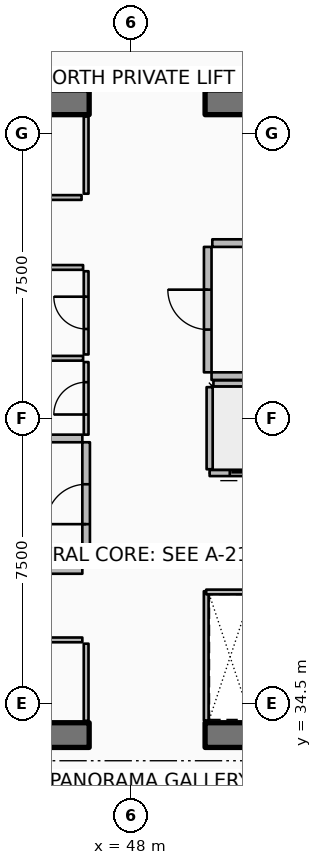
"""IFC4 building model, lengths in metres.
Left out: names, types, materials, properties, quantities, classifications, styles, units other than length and angle.
Written with IfcOpenShell. Run it as: python <this file> out.ifc"""

import sys

from ifc_helpers import new_model, si_unit, direction, frame, frame_2d, origin, place, context, subcontext, project, spatial, rectangle, extrude, element, fill, save


model = new_model("IFC4")
c1 = context("Model", 3, precision=1e-05, world=origin(), true_north=direction((0.0, 1.0)))
c2 = subcontext(c1, "Body", "Model", "MODEL_VIEW")
j1 = project(units=[si_unit("LENGTHUNIT", "METRE"), si_unit("PLANEANGLEUNIT", "RADIAN")], contexts=[c1])
p1 = place(None, origin())
s1 = spatial("IfcSite", under=j1, at=p1, CompositionType="ELEMENT")
p2 = place(p1, origin())
s2 = spatial("IfcBuilding", under=s1, at=p2, CompositionType="ELEMENT")
p3 = place(p2, frame((0.0, 0.0, 240.55)))
s3 = spatial("IfcBuildingStorey", under=s2, at=p3, CompositionType="ELEMENT", Elevation=240.55)
for number, where, z_axis, x_axis in (
    (1, (37.15, 33.675, 0.0), (0.0, 0.0, 1.0), (1.0, 0.0, 0.0)),
    (2, (49.95, 33.675, 0.0), (0.0, 0.0, 1.0), (1.0, 0.0, 0.0)),
    (3, (37.15, 50.325, 0.0), (0.0, 0.0, 1.0), (1.0, 0.0, 0.0)),
    (4, (49.95, 50.325, 0.0), (0.0, 0.0, 1.0), (1.0, 0.0, 0.0)),
):
    element("IfcWall", number, at=place(p3, frame(where, z_axis=z_axis, x_axis=x_axis)), inside=s3, PredefinedType="SHEAR", context=c2, shape_type="SweptSolid", body=[
        extrude(rectangle(XDim=9.75, YDim=0.65, at=frame_2d((4.875, 0.0))), origin(), (0.0, 0.0, 1.0), 3.85),
    ])
p4 = place(p3, frame((52.23, 40.57, 0.0), z_axis=(0.0, 0.0, 1.0), x_axis=(-1.0, 0.0, 0.0)))
e5 = element("IfcWall", 5, at=p4, inside=s3, PredefinedType="PARTITIONING", context=c2, shape_type="SweptSolid", body=[
    extrude(rectangle(XDim=2.16, YDim=0.16, at=frame_2d((1.08, 0.0))), origin(), (0.0, 0.0, 1.0), 3.59),
])
p5 = place(p4, frame((0.53, 0.0, 0.0)))
e6 = element("IfcOpeningElement", 6, at=p5, cuts=e5, PredefinedType="OPENING", context=c2, shape_type="SweptSolid", body=[
    extrude(rectangle(XDim=1.1, YDim=2.1, at=frame_2d((0.55, 1.05))), frame((0.0, 0.09, 0.0), z_axis=(0.0, -1.0, 0.0), x_axis=(1.0, 0.0, 0.0)), (0.0, 0.0, 1.0), 0.18),
])
p6 = place(p3, frame((50.07, 40.67, 0.0), z_axis=(0.0, 0.0, 1.0), x_axis=(0.0, 1.0, 0.0)))
e7 = element("IfcWall", 7, at=p6, inside=s3, PredefinedType="PARTITIONING", context=c2, shape_type="SweptSolid", body=[
    extrude(rectangle(XDim=2.16, YDim=0.16, at=frame_2d((1.08, 0.0))), origin(), (0.0, 0.0, 1.0), 3.59),
])
p7 = place(p3, frame((50.17, 42.93, 0.0), z_axis=(0.0, 0.0, 1.0), x_axis=(1.0, 0.0, 0.0)))
e8 = element("IfcWall", 8, at=p7, inside=s3, PredefinedType="PARTITIONING", context=c2, shape_type="SweptSolid", body=[
    extrude(rectangle(XDim=1.96, YDim=0.16, at=frame_2d((0.98, 0.0))), origin(), (0.0, 0.0, 1.0), 3.59),
])
p8 = place(p3, frame((46.82, 34.05, 0.0), z_axis=(0.0, 0.0, 1.0), x_axis=(0.0, 1.0, 0.0)))
e9 = element("IfcWall", 9, at=p8, inside=s3, PredefinedType="PARTITIONING", context=c2, shape_type="SweptSolid", body=[
    extrude(rectangle(XDim=2.03, YDim=0.125, at=frame_2d((1.015, 0.0))), origin(), (0.0, 0.0, 1.0), 3.03),
])
p9 = place(p3, frame((37.92, 36.18, 0.0), z_axis=(0.0, 0.0, 1.0), x_axis=(1.0, 0.0, 0.0)))
e10 = element("IfcWall", 10, at=p9, inside=s3, PredefinedType="PARTITIONING", context=c2, shape_type="SweptSolid", body=[
    extrude(rectangle(XDim=8.8, YDim=0.125, at=frame_2d((4.4, 0.0))), origin(), (0.0, 0.0, 1.0), 3.03),
])
p10 = place(p9, frame((3.975, 0.0, 0.0)))
e11 = element("IfcOpeningElement", 11, at=p10, cuts=e10, PredefinedType="OPENING", context=c2, shape_type="SweptSolid", body=[
    extrude(rectangle(XDim=0.85, YDim=2.06, at=frame_2d((0.425, 1.03))), frame((0.0, 0.073, 0.0), z_axis=(0.0, -1.0, 0.0), x_axis=(1.0, 0.0, 0.0)), (0.0, 0.0, 1.0), 0.145),
])
p11 = place(p3, frame((46.82, 47.92, 0.0), z_axis=(0.0, 0.0, 1.0), x_axis=(0.0, 1.0, 0.0)))
e12 = element("IfcWall", 12, at=p11, inside=s3, PredefinedType="PARTITIONING", context=c2, shape_type="SweptSolid", body=[
    extrude(rectangle(XDim=2.03, YDim=0.125, at=frame_2d((1.015, 0.0))), origin(), (0.0, 0.0, 1.0), 3.03),
])
p12 = place(p3, frame((42.2, 47.82, 0.0), z_axis=(0.0, 0.0, 1.0), x_axis=(1.0, 0.0, 0.0)))
e13 = element("IfcWall", 13, at=p12, inside=s3, PredefinedType="PARTITIONING", context=c2, shape_type="SweptSolid", body=[
    extrude(rectangle(XDim=4.5, YDim=0.125, at=frame_2d((2.25, 0.0))), origin(), (0.0, 0.0, 1.0), 3.03),
])
p13 = place(p12, frame((1.825, 0.0, 0.0)))
e14 = element("IfcOpeningElement", 14, at=p13, cuts=e13, PredefinedType="OPENING", context=c2, shape_type="SweptSolid", body=[
    extrude(rectangle(XDim=0.85, YDim=2.06, at=frame_2d((0.425, 1.03))), frame((0.0, 0.073, 0.0), z_axis=(0.0, -1.0, 0.0), x_axis=(1.0, 0.0, 0.0)), (0.0, 0.0, 1.0), 0.145),
])
p14 = place(p3, frame((41.35, 38.02, 0.0), z_axis=(0.0, 0.0, 1.0), x_axis=(1.0, 0.0, 0.0)))
e15 = element("IfcWall", 15, at=p14, inside=s3, PredefinedType="PARTITIONING", context=c2, shape_type="SweptSolid", body=[
    extrude(rectangle(XDim=5.37, YDim=0.2, at=frame_2d((2.685, 0.0))), origin(), (0.0, 0.0, 1.0), 3.59),
])
p15 = place(p3, frame((43.92, 41.48, 0.0), z_axis=(0.0, 0.0, 1.0), x_axis=(1.0, 0.0, 0.0)))
e16 = element("IfcWall", 16, at=p15, inside=s3, PredefinedType="PARTITIONING", context=c2, shape_type="SweptSolid", body=[
    extrude(rectangle(XDim=2.8, YDim=0.2, at=frame_2d((1.4, 0.0))), origin(), (0.0, 0.0, 1.0), 3.59),
])
p16 = place(p3, frame((46.82, 38.12, 0.0), z_axis=(0.0, 0.0, 1.0), x_axis=(0.0, 1.0, 0.0)))
e17 = element("IfcWall", 17, at=p16, inside=s3, PredefinedType="PARTITIONING", context=c2, shape_type="SweptSolid", body=[
    extrude(rectangle(XDim=3.26, YDim=0.2, at=frame_2d((1.63, 0.0))), origin(), (0.0, 0.0, 1.0), 3.59),
])
p17 = place(p16, frame((1.105, 0.0, 0.0)))
e18 = element("IfcOpeningElement", 18, at=p17, cuts=e17, PredefinedType="OPENING", context=c2, shape_type="SweptSolid", body=[
    extrude(rectangle(XDim=1.05, YDim=2.1, at=frame_2d((0.525, 1.05))), frame((0.0, 0.11, 0.0), z_axis=(0.0, -1.0, 0.0), x_axis=(1.0, 0.0, 0.0)), (0.0, 0.0, 1.0), 0.22),
])
p18 = place(p3, frame((50.12, 43.12, 0.0), z_axis=(0.0, 0.0, 1.0), x_axis=(1.0, 0.0, 0.0)))
e19 = element("IfcWall", 19, at=p18, inside=s3, PredefinedType="PARTITIONING", context=c2, shape_type="SweptSolid", body=[
    extrude(rectangle(XDim=8.88, YDim=0.2, at=frame_2d((4.44, 0.0))), origin(), (0.0, 0.0, 1.0), 3.59),
])
p19 = place(p3, frame((50.14, 46.62, 0.0), z_axis=(0.0, 0.0, 1.0), x_axis=(1.0, 0.0, 0.0)))
e20 = element("IfcWall", 20, at=p19, inside=s3, PredefinedType="PARTITIONING", context=c2, shape_type="SweptSolid", body=[
    extrude(rectangle(XDim=1.02, YDim=0.2, at=frame_2d((0.51, 0.0))), origin(), (0.0, 0.0, 1.0), 3.59),
])
p20 = place(p3, frame((50.02, 43.22, 0.0), z_axis=(0.0, 0.0, 1.0), x_axis=(0.0, 1.0, 0.0)))
e21 = element("IfcWall", 21, at=p20, inside=s3, PredefinedType="PARTITIONING", context=c2, shape_type="SweptSolid", body=[
    extrude(rectangle(XDim=3.3, YDim=0.2, at=frame_2d((1.65, 0.0))), origin(), (0.0, 0.0, 1.0), 3.59),
])
p21 = place(p20, frame((1.125, 0.0, 0.0)))
e22 = element("IfcOpeningElement", 22, at=p21, cuts=e21, PredefinedType="OPENING", context=c2, shape_type="SweptSolid", body=[
    extrude(rectangle(XDim=1.05, YDim=2.1, at=frame_2d((0.525, 1.05))), frame((0.0, 0.11, 0.0), z_axis=(0.0, -1.0, 0.0), x_axis=(1.0, 0.0, 0.0)), (0.0, 0.0, 1.0), 0.22),
])
p22 = place(p3, frame((49.98, 34.06, 0.0), z_axis=(0.0, 0.0, 1.0), x_axis=(0.0, 1.0, 0.0)))
e23 = element("IfcWall", 23, at=p22, inside=s3, PredefinedType="PARTITIONING", context=c2, shape_type="SweptSolid", body=[
    extrude(rectangle(XDim=3.4, YDim=0.125, at=frame_2d((1.7, 0.0))), origin(), (0.0, 0.0, 1.0), 3.03),
])
p23 = place(p3, frame((49.98, 37.44, 0.0), z_axis=(0.0, 0.0, 1.0), x_axis=(1.0, 0.0, 0.0)))
e24 = element("IfcWall", 24, at=p23, inside=s3, PredefinedType="PARTITIONING", context=c2, shape_type="SweptSolid", body=[
    extrude(rectangle(XDim=1.26, YDim=0.125, at=frame_2d((0.63, 0.0))), origin(), (0.0, 0.0, 1.0), 3.03),
])
p24 = place(p3, frame((44.03, 43.59, 0.0), z_axis=(0.0, 0.0, 1.0), x_axis=(1.0, 0.0, 0.0)))
e25 = element("IfcWall", 25, at=p24, inside=s3, PredefinedType="PARTITIONING", context=c2, shape_type="SweptSolid", body=[
    extrude(rectangle(XDim=2.71, YDim=0.125, at=frame_2d((1.355, 0.0))), origin(), (0.0, 0.0, 1.0), 3.03),
])
p25 = place(p3, frame((46.82, 41.58, 0.0), z_axis=(0.0, 0.0, 1.0), x_axis=(0.0, 1.0, 0.0)))
e26 = element("IfcWall", 26, at=p25, inside=s3, PredefinedType="PARTITIONING", context=c2, shape_type="SweptSolid", body=[
    extrude(rectangle(XDim=1.91, YDim=0.125, at=frame_2d((0.955, 0.0))), origin(), (0.0, 0.0, 1.0), 3.03),
])
p26 = place(p25, frame((0.53, 0.0, 0.0)))
e27 = element("IfcOpeningElement", 27, at=p26, cuts=e26, PredefinedType="OPENING", context=c2, shape_type="SweptSolid", body=[
    extrude(rectangle(XDim=0.85, YDim=2.06, at=frame_2d((0.425, 1.03))), frame((0.0, 0.073, 0.0), z_axis=(0.0, -1.0, 0.0), x_axis=(1.0, 0.0, 0.0)), (0.0, 0.0, 1.0), 0.145),
])
p27 = place(p3, frame((46.82, 43.69, 0.0), z_axis=(0.0, 0.0, 1.0), x_axis=(0.0, 1.0, 0.0)))
e28 = element("IfcWall", 28, at=p27, inside=s3, PredefinedType="PARTITIONING", context=c2, shape_type="SweptSolid", body=[
    extrude(rectangle(XDim=2.19, YDim=0.125, at=frame_2d((1.095, 0.0))), origin(), (0.0, 0.0, 1.0), 3.03),
])
p28 = place(p27, frame((0.67, 0.0, 0.0)))
e29 = element("IfcOpeningElement", 29, at=p28, cuts=e28, PredefinedType="OPENING", context=c2, shape_type="SweptSolid", body=[
    extrude(rectangle(XDim=0.85, YDim=2.06, at=frame_2d((0.425, 1.03))), frame((0.0, 0.073, 0.0), z_axis=(0.0, -1.0, 0.0), x_axis=(1.0, 0.0, 0.0)), (0.0, 0.0, 1.0), 0.145),
])
p29 = place(p3, frame((45.48, 45.98, 0.0), z_axis=(0.0, 0.0, 1.0), x_axis=(1.0, 0.0, 0.0)))
e30 = element("IfcWall", 30, at=p29, inside=s3, PredefinedType="PARTITIONING", context=c2, shape_type="SweptSolid", body=[
    extrude(rectangle(XDim=1.26, YDim=0.125, at=frame_2d((0.63, 0.0))), origin(), (0.0, 0.0, 1.0), 3.03),
])
p30 = place(p5, origin())
e31 = element("IfcDoor", 31, at=p30, inside=s3, OperationType="DOUBLE_DOOR_SLIDING", PredefinedType="DOOR", context=c2, shape_type="SweptSolid", body=[
    extrude(rectangle(XDim=1.1, YDim=2.1, at=frame_2d((0.55, 1.05))), frame((0.0, 0.025, 0.0), z_axis=(0.0, -1.0, 0.0), x_axis=(1.0, 0.0, 0.0)), (0.0, 0.0, 1.0), 0.05),
])
fill(e6, e31)
p31 = place(p17, origin())
e32 = element("IfcDoor", 32, at=p31, inside=s3, OperationType="SINGLE_SWING_LEFT", PredefinedType="DOOR", context=c2, shape_type="SweptSolid", body=[
    extrude(rectangle(XDim=1.05, YDim=2.1, at=frame_2d((0.525, 1.05))), frame((0.0, 0.025, 0.0), z_axis=(0.0, -1.0, 0.0), x_axis=(1.0, 0.0, 0.0)), (0.0, 0.0, 1.0), 0.05),
])
fill(e18, e32)
p32 = place(p21, origin())
e33 = element("IfcDoor", 33, at=p32, inside=s3, OperationType="SINGLE_SWING_RIGHT", PredefinedType="DOOR", context=c2, shape_type="SweptSolid", body=[
    extrude(rectangle(XDim=1.05, YDim=2.1, at=frame_2d((0.525, 1.05))), frame((0.0, 0.025, 0.0), z_axis=(0.0, -1.0, 0.0), x_axis=(1.0, 0.0, 0.0)), (0.0, 0.0, 1.0), 0.05),
])
fill(e22, e33)
p33 = place(p26, origin())
e34 = element("IfcDoor", 34, at=p33, inside=s3, OperationType="SINGLE_SWING_LEFT", PredefinedType="DOOR", context=c2, shape_type="SweptSolid", body=[
    extrude(rectangle(XDim=0.85, YDim=2.06, at=frame_2d((0.425, 1.03))), frame((0.0, 0.025, 0.0), z_axis=(0.0, -1.0, 0.0), x_axis=(1.0, 0.0, 0.0)), (0.0, 0.0, 1.0), 0.05),
])
fill(e27, e34)
p34 = place(p28, origin())
e35 = element("IfcDoor", 35, at=p34, inside=s3, OperationType="SINGLE_SWING_RIGHT", PredefinedType="DOOR", context=c2, shape_type="SweptSolid", body=[
    extrude(rectangle(XDim=0.85, YDim=2.06, at=frame_2d((0.425, 1.03))), frame((0.0, 0.025, 0.0), z_axis=(0.0, -1.0, 0.0), x_axis=(1.0, 0.0, 0.0)), (0.0, 0.0, 1.0), 0.05),
])
fill(e29, e35)
save(model, sys.argv[1])
